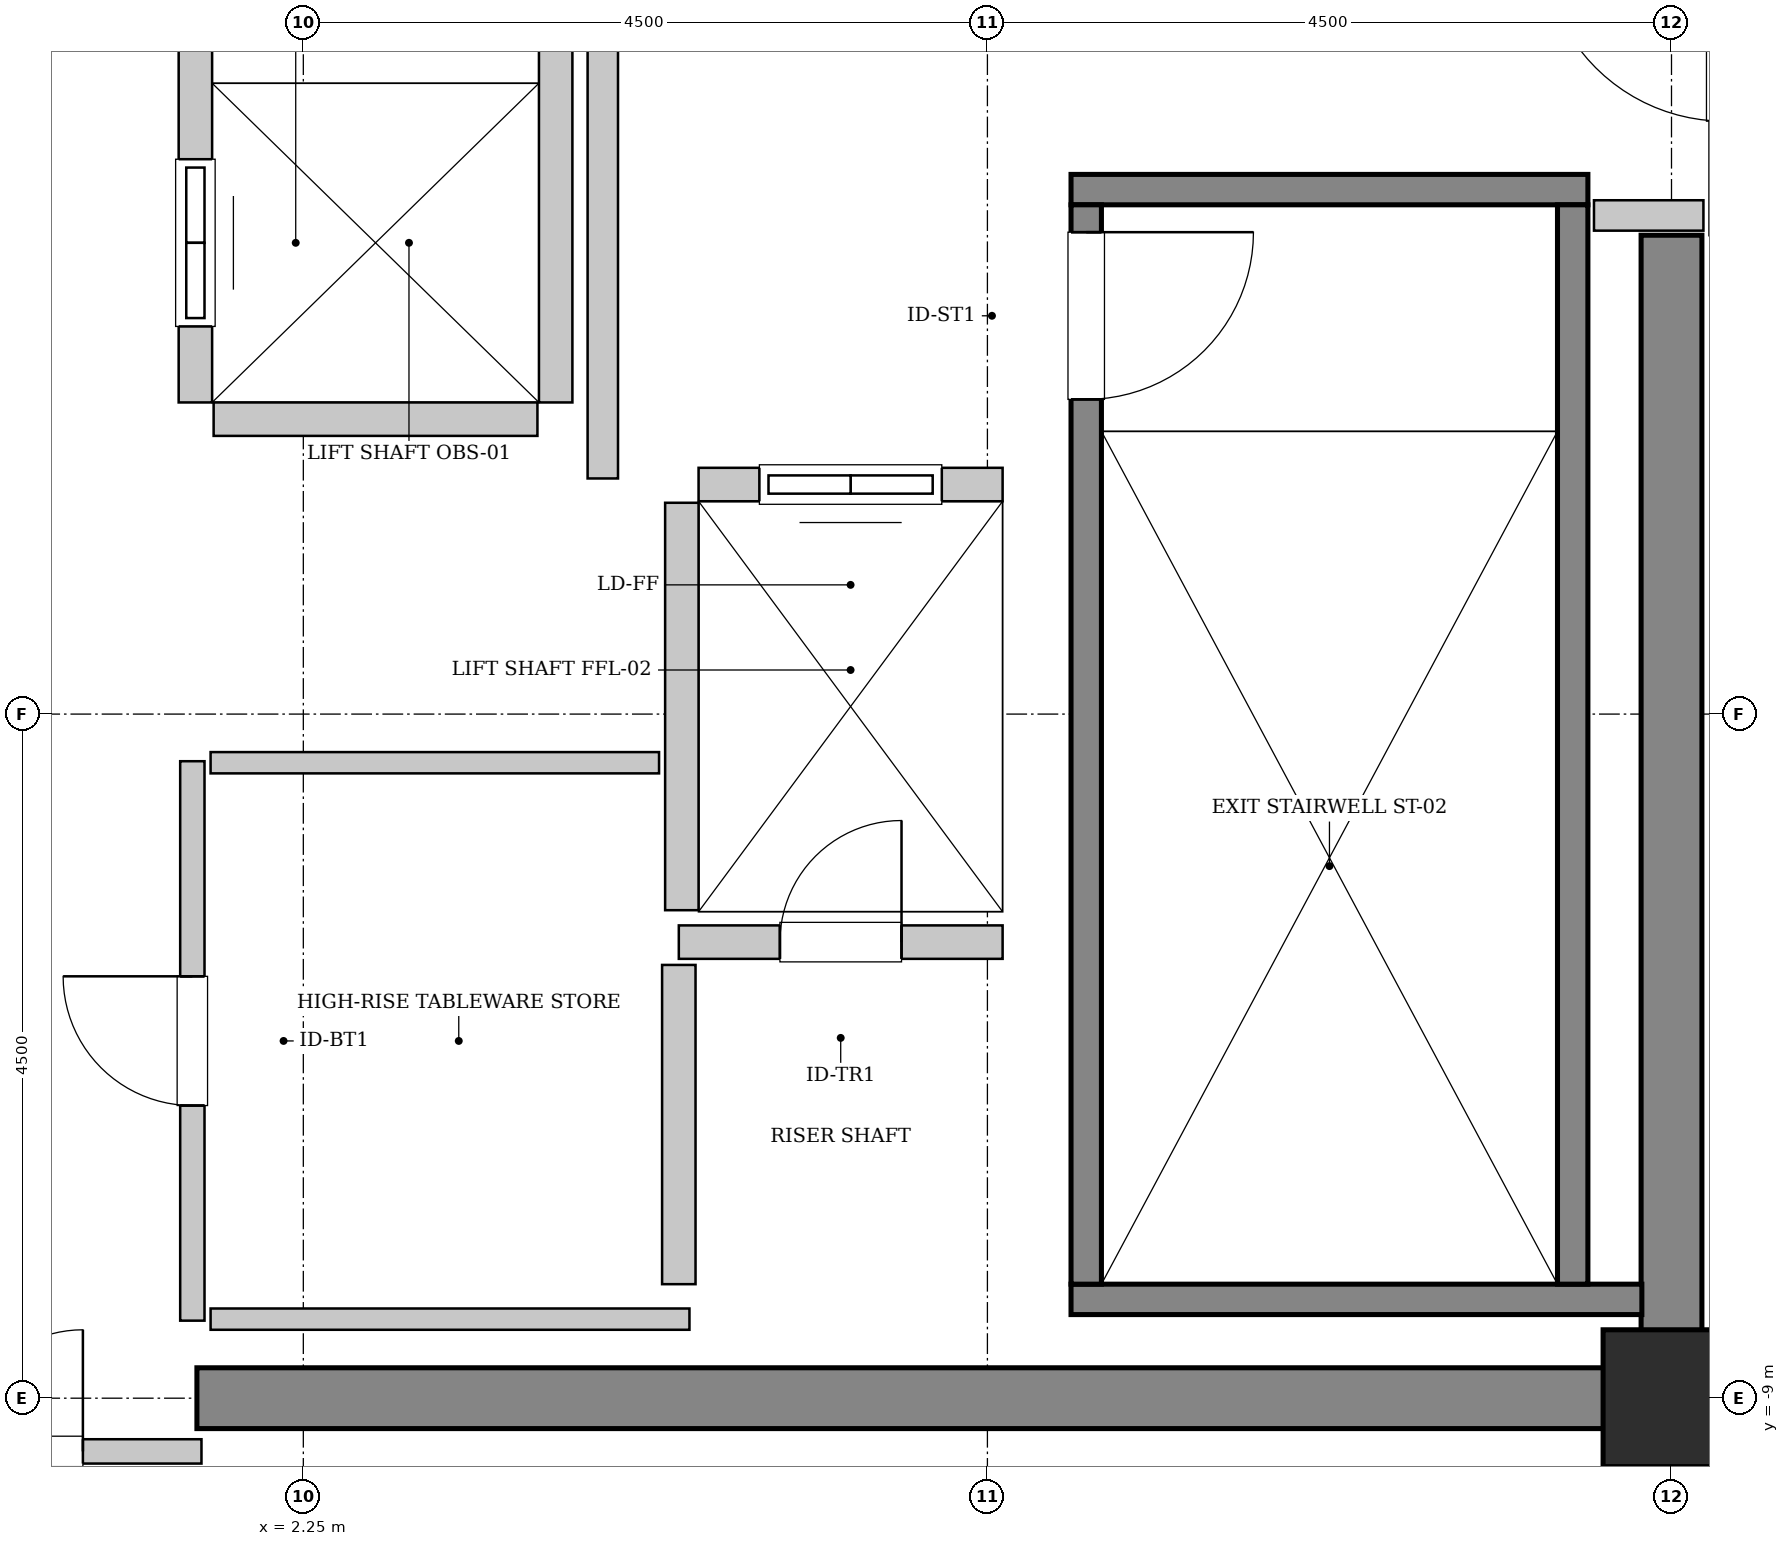
"""IFC4 building model, lengths in metres.
Left out: names, types, materials, properties, quantities, classifications, styles, units other than length and angle.
Written with IfcOpenShell. Run it as: python <this file> out.ifc"""

import sys

from ifc_helpers import new_model, si_unit, direction, frame, frame_2d, origin, origin_2d, place, context, subcontext, project, spatial, rectangle, extrude, source, transform, mapped, element, fill, save


model = new_model("IFC4")
c1 = context("Model", 3, precision=1e-05, world=origin(), true_north=direction((0.0, 1.0)))
c2 = subcontext(c1, "Body", "Model", "MODEL_VIEW")
j1 = project(units=[si_unit("LENGTHUNIT", "METRE"), si_unit("PLANEANGLEUNIT", "RADIAN")], contexts=[c1])
p1 = place(None, origin())
s1 = spatial("IfcSite", under=j1, at=p1, CompositionType="ELEMENT")
p2 = place(p1, origin())
s2 = spatial("IfcBuilding", under=s1, at=p2, CompositionType="ELEMENT")
p3 = place(p2, frame((0.0, 0.0, 349.0)))
s3 = spatial("IfcBuildingStorey", under=s2, at=p3, CompositionType="ELEMENT", Elevation=349.0)
m1 = source(origin(), c2, "Body", "SweptSolid", [
    extrude(rectangle(XDim=9.9, YDim=0.4, at=frame_2d((4.95, 0.0))), origin(), (0.0, 0.0, 1.0), 4.8),
])
p4 = place(p3, frame((1.55, -9.0, 0.0), z_axis=(0.0, 0.0, 1.0), x_axis=(1.0, 0.0, 0.0)))
e1 = element("IfcWall", 1, at=p4, inside=s3, PredefinedType="SHEAR", context=c2, shape_type="MappedRepresentation", body=[
    mapped(m1, transform((0.0, 0.0, 0.0), x_axis=(1.0, 0.0, 0.0), y_axis=(0.0, 1.0, 0.0), z_axis=(0.0, 0.0, 1.0), scale=1.0)),
])
m2 = source(origin(), c2, "Body", "SweptSolid", [
    extrude(rectangle(XDim=7.45, YDim=0.4, at=frame_2d((3.725, 0.0))), origin(), (0.0, 0.0, 1.0), 4.8),
])
p5 = place(p3, frame((11.25, -8.8, 0.0), z_axis=(0.0, 0.0, 1.0), x_axis=(0.0, 1.0, 0.0)))
e2 = element("IfcWall", 2, at=p5, inside=s3, PredefinedType="SHEAR", context=c2, shape_type="MappedRepresentation", body=[
    mapped(m2, transform((0.0, 0.0, 0.0), x_axis=(1.0, 0.0, 0.0), y_axis=(0.0, 1.0, 0.0), z_axis=(0.0, 0.0, 1.0), scale=1.0)),
])
m3 = source(origin(), c2, "Body", "SweptSolid", [
    extrude(rectangle(XDim=0.9, YDim=0.9, at=origin_2d()), origin(), (0.0, 0.0, 1.0), 4.8),
])
p6 = place(p3, frame((11.25, -9.0, 0.0), z_axis=(0.0, 0.0, 1.0), x_axis=(1.0, 0.0, 0.0)))
e3 = element("IfcColumn", 3, at=p6, inside=s3, PredefinedType="COLUMN", context=c2, shape_type="MappedRepresentation", body=[
    mapped(m3, transform((0.0, 0.0, 0.0), x_axis=(1.0, 0.0, 0.0), y_axis=(0.0, 1.0, 0.0), z_axis=(0.0, 0.0, 1.0), scale=1.0)),
])
m4 = source(origin(), c2, "Body", "SweptSolid", [
    extrude(rectangle(XDim=3.4, YDim=0.2, at=frame_2d((1.7, 0.0))), origin(), (0.0, 0.0, 1.0), 4.8),
])
p7 = place(p3, frame((7.3, -1.05, 0.0), z_axis=(0.0, 0.0, 1.0), x_axis=(1.0, 0.0, 0.0)))
e4 = element("IfcWall", 4, at=p7, inside=s3, PredefinedType="SOLIDWALL", context=c2, shape_type="MappedRepresentation", body=[
    mapped(m4, transform((0.0, 0.0, 0.0), x_axis=(1.0, 0.0, 0.0), y_axis=(0.0, 1.0, 0.0), z_axis=(0.0, 0.0, 1.0), scale=1.0)),
])
m5 = source(origin(), c2, "Body", "SweptSolid", [
    extrude(rectangle(XDim=3.755, YDim=0.2, at=frame_2d((1.877, 0.0))), origin(), (0.0, 0.0, 1.0), 4.8),
])
p8 = place(p3, frame((7.3, -8.35, 0.0), z_axis=(0.0, 0.0, 1.0), x_axis=(1.0, 0.0, 0.0)))
e5 = element("IfcWall", 5, at=p8, inside=s3, PredefinedType="SOLIDWALL", context=c2, shape_type="MappedRepresentation", body=[
    mapped(m5, transform((0.0, 0.0, 0.0), x_axis=(1.0, 0.0, 0.0), y_axis=(0.0, 1.0, 0.0), z_axis=(0.0, 0.0, 1.0), scale=1.0)),
])
m6 = source(origin(), c2, "Body", "SweptSolid", [
    extrude(rectangle(XDim=7.1, YDim=0.2, at=frame_2d((3.55, 0.0))), origin(), (0.0, 0.0, 1.0), 4.8),
])
p9 = place(p3, frame((7.4, -1.15, 0.0), z_axis=(0.0, 0.0, 1.0), x_axis=(0.0, -1.0, 0.0)))
e6 = element("IfcWall", 6, at=p9, inside=s3, PredefinedType="SOLIDWALL", context=c2, shape_type="MappedRepresentation", body=[
    mapped(m6, transform((0.0, 0.0, 0.0), x_axis=(1.0, 0.0, 0.0), y_axis=(0.0, 1.0, 0.0), z_axis=(0.0, 0.0, 1.0), scale=1.0)),
])
p10 = place(p9, frame((0.18, 0.0, 0.0)))
e7 = element("IfcOpeningElement", 7, at=p10, cuts=e6, PredefinedType="OPENING", context=c2, shape_type="SweptSolid", body=[
    extrude(rectangle(XDim=1.1, YDim=2.15, at=frame_2d((0.55, 1.075))), frame((0.0, 0.11, 0.0), z_axis=(0.0, -1.0, 0.0), x_axis=(1.0, 0.0, 0.0)), (0.0, 0.0, 1.0), 0.22),
])
p11 = place(p3, frame((10.6, -1.15, 0.0), z_axis=(0.0, 0.0, 1.0), x_axis=(0.0, -1.0, 0.0)))
e8 = element("IfcWall", 8, at=p11, inside=s3, PredefinedType="SOLIDWALL", context=c2, shape_type="MappedRepresentation", body=[
    mapped(m6, transform((0.0, 0.0, 0.0), x_axis=(1.0, 0.0, 0.0), y_axis=(0.0, 1.0, 0.0), z_axis=(0.0, 0.0, 1.0), scale=1.0)),
])
m7 = source(origin(), c2, "Body", "SweptSolid", [
    extrude(rectangle(XDim=2.0, YDim=0.22, at=frame_2d((1.0, 0.0))), origin(), (0.0, 0.0, 1.0), 4.485),
])
p12 = place(p3, frame((6.85, -2.99, 0.0), z_axis=(0.0, 0.0, 1.0), x_axis=(-1.0, 0.0, 0.0)))
e9 = element("IfcWall", 9, at=p12, inside=s3, PredefinedType="SOLIDWALL", context=c2, shape_type="MappedRepresentation", body=[
    mapped(m7, transform((0.0, 0.0, 0.0), x_axis=(1.0, 0.0, 0.0), y_axis=(0.0, 1.0, 0.0), z_axis=(0.0, 0.0, 1.0), scale=1.0)),
])
p13 = place(p12, frame((0.4, 0.0, 0.0)))
e10 = element("IfcOpeningElement", 10, at=p13, cuts=e9, PredefinedType="OPENING", context=c2, shape_type="SweptSolid", body=[
    extrude(rectangle(XDim=1.2, YDim=2.2, at=frame_2d((0.6, 1.1))), frame((0.0, 0.12, 0.0), z_axis=(0.0, -1.0, 0.0), x_axis=(1.0, 0.0, 0.0)), (0.0, 0.0, 1.0), 0.24),
])
m8 = source(origin(), c2, "Body", "SweptSolid", [
    extrude(rectangle(XDim=2.68, YDim=0.22, at=frame_2d((1.34, 0.0))), origin(), (0.0, 0.0, 1.0), 4.485),
])
p14 = place(p3, frame((4.74, -3.11, 0.0), z_axis=(0.0, 0.0, 1.0), x_axis=(0.0, -1.0, 0.0)))
e11 = element("IfcWall", 11, at=p14, inside=s3, PredefinedType="SOLIDWALL", context=c2, shape_type="MappedRepresentation", body=[
    mapped(m8, transform((0.0, 0.0, 0.0), x_axis=(1.0, 0.0, 0.0), y_axis=(0.0, 1.0, 0.0), z_axis=(0.0, 0.0, 1.0), scale=1.0)),
])
m9 = source(origin(), c2, "Body", "SweptSolid", [
    extrude(rectangle(XDim=4.9, YDim=0.22, at=frame_2d((2.45, 0.0))), origin(), (0.0, 0.0, 1.0), 4.485),
])
p15 = place(p3, frame((1.54, 2.45, 0.0), z_axis=(0.0, 0.0, 1.0), x_axis=(0.0, -1.0, 0.0)))
e12 = element("IfcWall", 12, at=p15, inside=s3, PredefinedType="SOLIDWALL", context=c2, shape_type="MappedRepresentation", body=[
    mapped(m9, transform((0.0, 0.0, 0.0), x_axis=(1.0, 0.0, 0.0), y_axis=(0.0, 1.0, 0.0), z_axis=(0.0, 0.0, 1.0), scale=1.0)),
])
p16 = place(p15, frame((3.3, 0.0, 0.0)))
e13 = element("IfcOpeningElement", 13, at=p16, cuts=e12, PredefinedType="OPENING", context=c2, shape_type="SweptSolid", body=[
    extrude(rectangle(XDim=1.1, YDim=2.2, at=frame_2d((0.55, 1.1))), frame((0.0, 0.12, 0.0), z_axis=(0.0, -1.0, 0.0), x_axis=(1.0, 0.0, 0.0)), (0.0, 0.0, 1.0), 0.24),
])
p17 = place(p15, frame((0.5, 0.0, 0.0)))
e14 = element("IfcOpeningElement", 14, at=p17, cuts=e12, PredefinedType="OPENING", context=c2, shape_type="SweptSolid", body=[
    extrude(rectangle(XDim=1.1, YDim=2.2, at=frame_2d((0.55, 1.1))), frame((0.0, 0.12, 0.0), z_axis=(0.0, -1.0, 0.0), x_axis=(1.0, 0.0, 0.0)), (0.0, 0.0, 1.0), 0.24),
])
p18 = place(p3, frame((3.91, -2.45, 0.0), z_axis=(0.0, 0.0, 1.0), x_axis=(0.0, 1.0, 0.0)))
e15 = element("IfcWall", 15, at=p18, inside=s3, PredefinedType="SOLIDWALL", context=c2, shape_type="MappedRepresentation", body=[
    mapped(m9, transform((0.0, 0.0, 0.0), x_axis=(1.0, 0.0, 0.0), y_axis=(0.0, 1.0, 0.0), z_axis=(0.0, 0.0, 1.0), scale=1.0)),
])
m10 = source(origin(), c2, "Body", "SweptSolid", [
    extrude(rectangle(XDim=2.13, YDim=0.22, at=frame_2d((1.065, 0.0))), origin(), (0.0, 0.0, 1.0), 4.485),
])
p19 = place(p3, frame((1.66, -2.56, 0.0), z_axis=(0.0, 0.0, 1.0), x_axis=(1.0, 0.0, 0.0)))
e16 = element("IfcWall", 16, at=p19, inside=s3, PredefinedType="SOLIDWALL", context=c2, shape_type="MappedRepresentation", body=[
    mapped(m10, transform((0.0, 0.0, 0.0), x_axis=(1.0, 0.0, 0.0), y_axis=(0.0, 1.0, 0.0), z_axis=(0.0, 0.0, 1.0), scale=1.0)),
])
p20 = place(p3, frame((4.72, -6.0, 0.0), z_axis=(0.0, 0.0, 1.0), x_axis=(1.0, 0.0, 0.0)))
e17 = element("IfcWall", 17, at=p20, inside=s3, PredefinedType="SOLIDWALL", context=c2, shape_type="MappedRepresentation", body=[
    mapped(m10, transform((0.0, 0.0, 0.0), x_axis=(1.0, 0.0, 0.0), y_axis=(0.0, 1.0, 0.0), z_axis=(0.0, 0.0, 1.0), scale=1.0)),
])
p21 = place(p20, frame((0.665, 0.0, 0.0)))
e18 = element("IfcOpeningElement", 18, at=p21, cuts=e17, PredefinedType="OPENING", context=c2, shape_type="SweptSolid", body=[
    extrude(rectangle(XDim=0.8, YDim=2.0, at=frame_2d((0.4, 1.0))), frame((0.0, 0.12, 0.0), z_axis=(0.0, -1.0, 0.0), x_axis=(1.0, 0.0, 0.0)), (0.0, 0.0, 1.0), 0.24),
])
m11 = source(origin(), c2, "Body", "SweptSolid", [
    extrude(rectangle(XDim=2.1, YDim=0.22, at=frame_2d((1.05, 0.0))), origin(), (0.0, 0.0, 1.0), 4.485),
])
p22 = place(p3, frame((4.72, -8.25, 0.0), z_axis=(0.0, 0.0, 1.0), x_axis=(0.0, 1.0, 0.0)))
e19 = element("IfcWall", 19, at=p22, inside=s3, PredefinedType="SOLIDWALL", context=c2, shape_type="MappedRepresentation", body=[
    mapped(m11, transform((0.0, 0.0, 0.0), x_axis=(1.0, 0.0, 0.0), y_axis=(0.0, 1.0, 0.0), z_axis=(0.0, 0.0, 1.0), scale=1.0)),
])
m12 = source(origin(), c2, "Body", "SweptSolid", [
    extrude(rectangle(XDim=5.9, YDim=0.2, at=frame_2d((2.95, 0.0))), origin(), (0.0, 0.0, 1.0), 4.485),
])
p23 = place(p3, frame((4.22, -2.95, 0.0), z_axis=(0.0, 0.0, 1.0), x_axis=(0.0, 1.0, 0.0)))
e20 = element("IfcWall", 20, at=p23, inside=s3, PredefinedType="PARTITIONING", context=c2, shape_type="MappedRepresentation", body=[
    mapped(m12, transform((0.0, 0.0, 0.0), x_axis=(1.0, 0.0, 0.0), y_axis=(0.0, 1.0, 0.0), z_axis=(0.0, 0.0, 1.0), scale=1.0)),
])
m13 = source(origin(), c2, "Body", "SweptSolid", [
    extrude(rectangle(XDim=0.72, YDim=0.2, at=frame_2d((0.36, 0.0))), origin(), (0.0, 0.0, 1.0), 4.485),
])
p24 = place(p3, frame((10.74, -1.22, 0.0), z_axis=(0.0, 0.0, 1.0), x_axis=(1.0, 0.0, 0.0)))
e21 = element("IfcWall", 21, at=p24, inside=s3, PredefinedType="PARTITIONING", context=c2, shape_type="MappedRepresentation", body=[
    mapped(m13, transform((0.0, 0.0, 0.0), x_axis=(1.0, 0.0, 0.0), y_axis=(0.0, 1.0, 0.0), z_axis=(0.0, 0.0, 1.0), scale=1.0)),
])
m14 = source(origin(), c2, "Body", "SweptSolid", [
    extrude(rectangle(XDim=3.16, YDim=0.16, at=frame_2d((1.58, 0.0))), origin(), (0.0, 0.0, 1.0), 3.575),
])
p25 = place(p3, frame((-1.58, -9.35, 0.0), z_axis=(0.0, 0.0, 1.0), x_axis=(1.0, 0.0, 0.0)))
e22 = element("IfcWall", 22, at=p25, inside=s3, PredefinedType="PARTITIONING", context=c2, shape_type="MappedRepresentation", body=[
    mapped(m14, transform((0.0, 0.0, 0.0), x_axis=(1.0, 0.0, 0.0), y_axis=(0.0, 1.0, 0.0), z_axis=(0.0, 0.0, 1.0), scale=1.0)),
])
p26 = place(p25, frame((0.78, 0.0, 0.0)))
e23 = element("IfcOpeningElement", 23, at=p26, cuts=e22, PredefinedType="OPENING", context=c2, shape_type="SweptSolid", body=[
    extrude(rectangle(XDim=1.6, YDim=2.3, at=frame_2d((0.8, 1.15))), frame((0.0, 0.09, 0.0), z_axis=(0.0, -1.0, 0.0), x_axis=(1.0, 0.0, 0.0)), (0.0, 0.0, 1.0), 0.18),
])
m15 = source(origin(), c2, "Body", "SweptSolid", [
    extrude(rectangle(XDim=3.68, YDim=0.16, at=frame_2d((1.84, 0.0))), origin(), (0.0, 0.0, 1.0), 4.485),
])
p27 = place(p3, frame((1.52, -8.49, 0.0), z_axis=(0.0, 0.0, 1.0), x_axis=(0.0, 1.0, 0.0)))
e24 = element("IfcWall", 24, at=p27, inside=s3, PredefinedType="PARTITIONING", context=c2, shape_type="MappedRepresentation", body=[
    mapped(m15, transform((0.0, 0.0, 0.0), x_axis=(1.0, 0.0, 0.0), y_axis=(0.0, 1.0, 0.0), z_axis=(0.0, 0.0, 1.0), scale=1.0)),
])
p28 = place(p27, frame((1.415, 0.0, 0.0)))
e25 = element("IfcOpeningElement", 25, at=p28, cuts=e24, PredefinedType="OPENING", context=c2, shape_type="SweptSolid", body=[
    extrude(rectangle(XDim=0.85, YDim=2.1, at=frame_2d((0.425, 1.05))), frame((0.0, 0.09, 0.0), z_axis=(0.0, -1.0, 0.0), x_axis=(1.0, 0.0, 0.0)), (0.0, 0.0, 1.0), 0.18),
])
m16 = source(origin(), c2, "Body", "SweptSolid", [
    extrude(rectangle(XDim=2.95, YDim=0.14, at=frame_2d((1.475, 0.0))), origin(), (0.0, 0.0, 1.0), 4.485),
])
p29 = place(p3, frame((1.64, -4.82, 0.0), z_axis=(0.0, 0.0, 1.0), x_axis=(1.0, 0.0, 0.0)))
e26 = element("IfcWall", 26, at=p29, inside=s3, PredefinedType="PARTITIONING", context=c2, shape_type="MappedRepresentation", body=[
    mapped(m16, transform((0.0, 0.0, 0.0), x_axis=(1.0, 0.0, 0.0), y_axis=(0.0, 1.0, 0.0), z_axis=(0.0, 0.0, 1.0), scale=1.0)),
])
m17 = source(origin(), c2, "Body", "SweptSolid", [
    extrude(rectangle(XDim=3.15, YDim=0.14, at=frame_2d((1.575, 0.0))), origin(), (0.0, 0.0, 1.0), 4.485),
])
p30 = place(p3, frame((1.64, -8.48, 0.0), z_axis=(0.0, 0.0, 1.0), x_axis=(1.0, 0.0, 0.0)))
e27 = element("IfcWall", 27, at=p30, inside=s3, PredefinedType="PARTITIONING", context=c2, shape_type="MappedRepresentation", body=[
    mapped(m17, transform((0.0, 0.0, 0.0), x_axis=(1.0, 0.0, 0.0), y_axis=(0.0, 1.0, 0.0), z_axis=(0.0, 0.0, 1.0), scale=1.0)),
])
m18 = source(origin(), c2, "Body", "SweptSolid", [
    extrude(rectangle(XDim=1.1, YDim=2.15, at=frame_2d((0.55, 1.075))), frame((0.0, 0.025, 0.0), z_axis=(0.0, -1.0, 0.0), x_axis=(1.0, 0.0, 0.0)), (0.0, 0.0, 1.0), 0.05),
])
p31 = place(p10, origin())
e28 = element("IfcDoor", 28, at=p31, inside=s3, OperationType="SINGLE_SWING_LEFT", PredefinedType="DOOR", context=c2, shape_type="MappedRepresentation", body=[
    mapped(m18, transform((0.0, 0.0, 0.0), x_axis=(1.0, 0.0, 0.0), y_axis=(0.0, 1.0, 0.0), z_axis=(0.0, 0.0, 1.0), scale=1.0)),
])
fill(e7, e28)
m19 = source(origin(), c2, "Body", "SweptSolid", [
    extrude(rectangle(XDim=1.2, YDim=2.2, at=frame_2d((0.6, 1.1))), frame((0.0, 0.025, 0.0), z_axis=(0.0, -1.0, 0.0), x_axis=(1.0, 0.0, 0.0)), (0.0, 0.0, 1.0), 0.05),
])
p32 = place(p13, origin())
e29 = element("IfcDoor", 29, at=p32, inside=s3, OperationType="SLIDING_TO_LEFT", PredefinedType="DOOR", context=c2, shape_type="MappedRepresentation", body=[
    mapped(m19, transform((0.0, 0.0, 0.0), x_axis=(1.0, 0.0, 0.0), y_axis=(0.0, 1.0, 0.0), z_axis=(0.0, 0.0, 1.0), scale=1.0)),
])
fill(e10, e29)
m20 = source(origin(), c2, "Body", "SweptSolid", [
    extrude(rectangle(XDim=1.1, YDim=2.2, at=frame_2d((0.55, 1.1))), frame((0.0, 0.025, 0.0), z_axis=(0.0, -1.0, 0.0), x_axis=(1.0, 0.0, 0.0)), (0.0, 0.0, 1.0), 0.05),
])
p33 = place(p16, origin())
e30 = element("IfcDoor", 30, at=p33, inside=s3, OperationType="DOUBLE_DOOR_SLIDING", PredefinedType="DOOR", context=c2, shape_type="MappedRepresentation", body=[
    mapped(m20, transform((0.0, 0.0, 0.0), x_axis=(1.0, 0.0, 0.0), y_axis=(0.0, 1.0, 0.0), z_axis=(0.0, 0.0, 1.0), scale=1.0)),
])
fill(e13, e30)
m21 = source(origin(), c2, "Body", "SweptSolid", [
    extrude(rectangle(XDim=0.8, YDim=2.0, at=frame_2d((0.4, 1.0))), frame((0.0, 0.025, 0.0), z_axis=(0.0, -1.0, 0.0), x_axis=(1.0, 0.0, 0.0)), (0.0, 0.0, 1.0), 0.05),
])
p34 = place(p21, origin())
e31 = element("IfcDoor", 31, at=p34, inside=s3, OperationType="SINGLE_SWING_RIGHT", PredefinedType="TRAPDOOR", context=c2, shape_type="MappedRepresentation", body=[
    mapped(m21, transform((0.0, 0.0, 0.0), x_axis=(1.0, 0.0, 0.0), y_axis=(0.0, 1.0, 0.0), z_axis=(0.0, 0.0, 1.0), scale=1.0)),
])
fill(e18, e31)
m22 = source(origin(), c2, "Body", "SweptSolid", [
    extrude(rectangle(XDim=1.6, YDim=2.3, at=frame_2d((0.8, 1.15))), frame((0.0, 0.025, 0.0), z_axis=(0.0, -1.0, 0.0), x_axis=(1.0, 0.0, 0.0)), (0.0, 0.0, 1.0), 0.05),
])
p35 = place(p26, origin())
e32 = element("IfcDoor", 32, at=p35, inside=s3, OperationType="DOUBLE_DOOR_SINGLE_SWING", PredefinedType="DOOR", context=c2, shape_type="MappedRepresentation", body=[
    mapped(m22, transform((0.0, 0.0, 0.0), x_axis=(1.0, 0.0, 0.0), y_axis=(0.0, 1.0, 0.0), z_axis=(0.0, 0.0, 1.0), scale=1.0)),
])
fill(e23, e32)
m23 = source(origin(), c2, "Body", "SweptSolid", [
    extrude(rectangle(XDim=0.85, YDim=2.1, at=frame_2d((0.425, 1.05))), frame((0.0, 0.025, 0.0), z_axis=(0.0, -1.0, 0.0), x_axis=(1.0, 0.0, 0.0)), (0.0, 0.0, 1.0), 0.05),
])
p36 = place(p28, origin())
e33 = element("IfcDoor", 33, at=p36, inside=s3, OperationType="SINGLE_SWING_RIGHT", PredefinedType="DOOR", context=c2, shape_type="MappedRepresentation", body=[
    mapped(m23, transform((0.0, 0.0, 0.0), x_axis=(1.0, 0.0, 0.0), y_axis=(0.0, 1.0, 0.0), z_axis=(0.0, 0.0, 1.0), scale=1.0)),
])
fill(e25, e33)
save(model, sys.argv[1])
